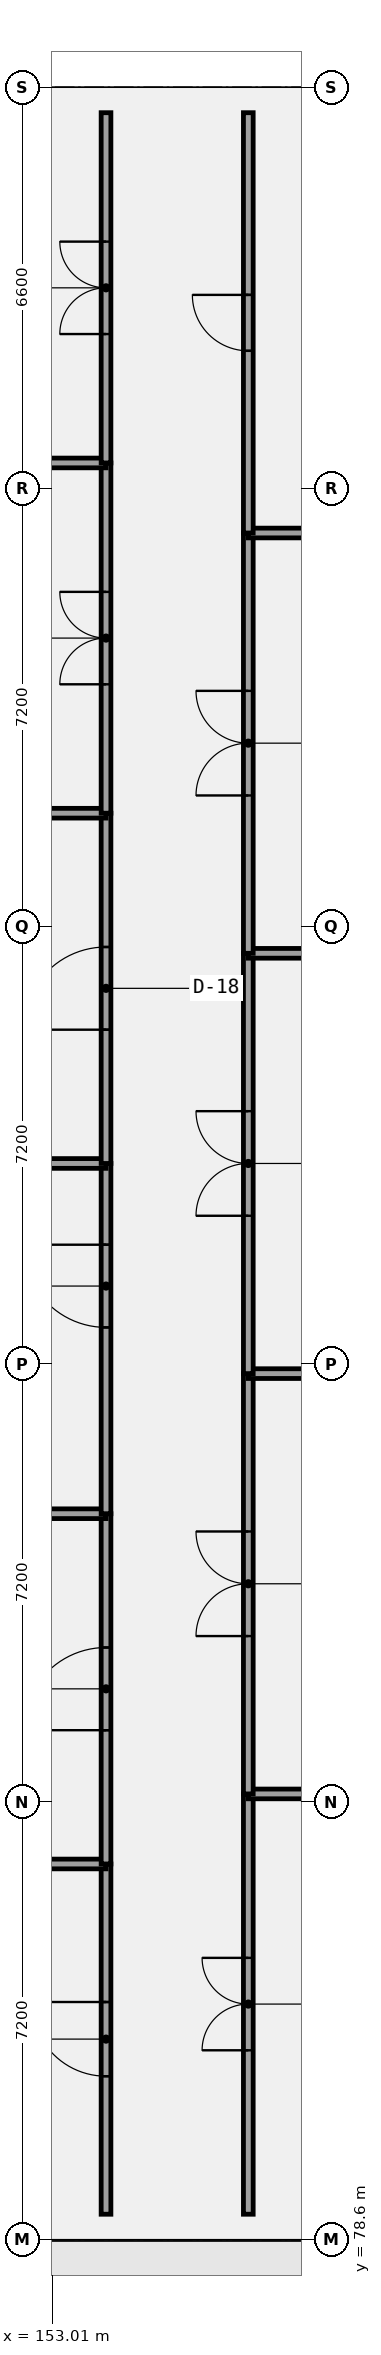
"""IFC4 building model, lengths in metres.
Left out: names, types, materials, properties, quantities, classifications, styles, units other than length and angle.
Written with IfcOpenShell. Run it as: python <this file> out.ifc"""

import sys

from ifc_helpers import new_model, si_unit, direction, frame, frame_2d, origin, place, context, subcontext, project, spatial, rectangle, extrude, element, fill, save


model = new_model("IFC4")
c1 = context("Model", 3, precision=1e-05, world=origin(), true_north=direction((0.0, 1.0)))
c2 = subcontext(c1, "Body", "Model", "MODEL_VIEW")
j1 = project(units=[si_unit("LENGTHUNIT", "METRE"), si_unit("PLANEANGLEUNIT", "RADIAN")], contexts=[c1])
p1 = place(None, origin())
s1 = spatial("IfcSite", under=j1, at=p1, CompositionType="ELEMENT")
p2 = place(p1, origin())
s2 = spatial("IfcBuilding", under=s1, at=p2, CompositionType="ELEMENT")
p3 = place(p2, frame((0.0, 0.0, 22.2)))
s3 = spatial("IfcBuildingStorey", under=s2, at=p3, CompositionType="ELEMENT", Elevation=22.2)
p4 = place(p3, frame((153.895, 79.02, 0.0), z_axis=(0.0, 0.0, 1.0), x_axis=(0.0, 1.0, 0.0)))
e1 = element("IfcWall", 1, at=p4, inside=s3, PredefinedType="PARTITIONING", context=c2, shape_type="SweptSolid", body=[
    extrude(rectangle(XDim=5.76, YDim=0.16, at=frame_2d((2.88, 0.0))), origin(), (0.0, 0.0, 1.0), 3.92),
])
p5 = place(p4, frame((2.27, 0.0, 0.0)))
e2 = element("IfcOpeningElement", 2, at=p5, cuts=e1, PredefinedType="OPENING", context=c2, shape_type="SweptSolid", body=[
    extrude(rectangle(XDim=1.22, YDim=2.35, at=frame_2d((0.61, 1.175))), frame((0.0, 0.09, 0.0), z_axis=(0.0, -1.0, 0.0), x_axis=(1.0, 0.0, 0.0)), (0.0, 0.0, 1.0), 0.18),
])
p6 = place(p3, frame((145.25, 84.78, 0.0), z_axis=(0.0, 0.0, 1.0), x_axis=(1.0, 0.0, 0.0)))
e3 = element("IfcWall", 3, at=p6, inside=s3, PredefinedType="PARTITIONING", context=c2, shape_type="SweptSolid", body=[
    extrude(rectangle(XDim=8.645, YDim=0.16, at=frame_2d((4.323, 0.0))), origin(), (0.0, 0.0, 1.0), 3.92),
])
p7 = place(p3, frame((153.895, 84.78, 0.0), z_axis=(0.0, 0.0, 1.0), x_axis=(0.0, 1.0, 0.0)))
e4 = element("IfcWall", 4, at=p7, inside=s3, PredefinedType="PARTITIONING", context=c2, shape_type="SweptSolid", body=[
    extrude(rectangle(XDim=5.76, YDim=0.16, at=frame_2d((2.88, 0.0))), origin(), (0.0, 0.0, 1.0), 3.92),
])
p8 = place(p7, frame((2.2, 0.0, 0.0)))
e5 = element("IfcOpeningElement", 5, at=p8, cuts=e4, PredefinedType="OPENING", context=c2, shape_type="SweptSolid", body=[
    extrude(rectangle(XDim=1.36, YDim=2.1, at=frame_2d((0.68, 1.05))), frame((0.0, 0.09, 0.0), z_axis=(0.0, -1.0, 0.0), x_axis=(1.0, 0.0, 0.0)), (0.0, 0.0, 1.0), 0.18),
])
p9 = place(p3, frame((145.25, 90.54, 0.0), z_axis=(0.0, 0.0, 1.0), x_axis=(1.0, 0.0, 0.0)))
e6 = element("IfcWall", 6, at=p9, inside=s3, PredefinedType="PARTITIONING", context=c2, shape_type="SweptSolid", body=[
    extrude(rectangle(XDim=8.645, YDim=0.16, at=frame_2d((4.323, 0.0))), origin(), (0.0, 0.0, 1.0), 3.92),
])
p10 = place(p3, frame((153.895, 90.54, 0.0), z_axis=(0.0, 0.0, 1.0), x_axis=(0.0, 1.0, 0.0)))
e7 = element("IfcWall", 7, at=p10, inside=s3, PredefinedType="PARTITIONING", context=c2, shape_type="SweptSolid", body=[
    extrude(rectangle(XDim=5.76, YDim=0.16, at=frame_2d((2.88, 0.0))), origin(), (0.0, 0.0, 1.0), 3.92),
])
p11 = place(p10, frame((3.064, 0.0, 0.0)))
e8 = element("IfcOpeningElement", 8, at=p11, cuts=e7, PredefinedType="OPENING", context=c2, shape_type="SweptSolid", body=[
    extrude(rectangle(XDim=1.36, YDim=2.22, at=frame_2d((0.68, 1.11))), frame((0.0, 0.09, 0.0), z_axis=(0.0, -1.0, 0.0), x_axis=(1.0, 0.0, 0.0)), (0.0, 0.0, 1.0), 0.18),
])
p12 = place(p3, frame((145.25, 96.3, 0.0), z_axis=(0.0, 0.0, 1.0), x_axis=(1.0, 0.0, 0.0)))
e9 = element("IfcWall", 9, at=p12, inside=s3, PredefinedType="PARTITIONING", context=c2, shape_type="SweptSolid", body=[
    extrude(rectangle(XDim=8.645, YDim=0.16, at=frame_2d((4.323, 0.0))), origin(), (0.0, 0.0, 1.0), 3.92),
])
p13 = place(p3, frame((153.895, 96.3, 0.0), z_axis=(0.0, 0.0, 1.0), x_axis=(0.0, 1.0, 0.0)))
e10 = element("IfcWall", 10, at=p13, inside=s3, PredefinedType="PARTITIONING", context=c2, shape_type="SweptSolid", body=[
    extrude(rectangle(XDim=5.76, YDim=0.16, at=frame_2d((2.88, 0.0))), origin(), (0.0, 0.0, 1.0), 3.92),
])
p14 = place(p13, frame((2.2, 0.0, 0.0)))
e11 = element("IfcOpeningElement", 11, at=p14, cuts=e10, PredefinedType="OPENING", context=c2, shape_type="SweptSolid", body=[
    extrude(rectangle(XDim=1.36, YDim=2.35, at=frame_2d((0.68, 1.175))), frame((0.0, 0.09, 0.0), z_axis=(0.0, -1.0, 0.0), x_axis=(1.0, 0.0, 0.0)), (0.0, 0.0, 1.0), 0.18),
])
p15 = place(p3, frame((145.25, 102.06, 0.0), z_axis=(0.0, 0.0, 1.0), x_axis=(1.0, 0.0, 0.0)))
e12 = element("IfcWall", 12, at=p15, inside=s3, PredefinedType="PARTITIONING", context=c2, shape_type="SweptSolid", body=[
    extrude(rectangle(XDim=8.645, YDim=0.16, at=frame_2d((4.323, 0.0))), origin(), (0.0, 0.0, 1.0), 3.37),
])
p16 = place(p3, frame((153.895, 102.06, 0.0), z_axis=(0.0, 0.0, 1.0), x_axis=(0.0, 1.0, 0.0)))
e13 = element("IfcWall", 13, at=p16, inside=s3, PredefinedType="PARTITIONING", context=c2, shape_type="SweptSolid", body=[
    extrude(rectangle(XDim=5.76, YDim=0.16, at=frame_2d((2.88, 0.0))), origin(), (0.0, 0.0, 1.0), 3.92),
])
p17 = place(p16, frame((2.12, 0.0, 0.0)))
e14 = element("IfcOpeningElement", 14, at=p17, cuts=e13, PredefinedType="OPENING", context=c2, shape_type="SweptSolid", body=[
    extrude(rectangle(XDim=1.52, YDim=2.1, at=frame_2d((0.76, 1.05))), frame((0.0, 0.09, 0.0), z_axis=(0.0, -1.0, 0.0), x_axis=(1.0, 0.0, 0.0)), (0.0, 0.0, 1.0), 0.18),
])
p18 = place(p3, frame((145.25, 107.82, 0.0), z_axis=(0.0, 0.0, 1.0), x_axis=(1.0, 0.0, 0.0)))
e15 = element("IfcWall", 15, at=p18, inside=s3, PredefinedType="PARTITIONING", context=c2, shape_type="SweptSolid", body=[
    extrude(rectangle(XDim=8.645, YDim=0.16, at=frame_2d((4.323, 0.0))), origin(), (0.0, 0.0, 1.0), 3.92),
])
p19 = place(p3, frame((153.895, 107.82, 0.0), z_axis=(0.0, 0.0, 1.0), x_axis=(0.0, 1.0, 0.0)))
e16 = element("IfcWall", 16, at=p19, inside=s3, PredefinedType="PARTITIONING", context=c2, shape_type="SweptSolid", body=[
    extrude(rectangle(XDim=5.76, YDim=0.16, at=frame_2d((2.88, 0.0))), origin(), (0.0, 0.0, 1.0), 3.92),
])
p20 = place(p19, frame((2.12, 0.0, 0.0)))
e17 = element("IfcOpeningElement", 17, at=p20, cuts=e16, PredefinedType="OPENING", context=c2, shape_type="SweptSolid", body=[
    extrude(rectangle(XDim=1.52, YDim=2.22, at=frame_2d((0.76, 1.11))), frame((0.0, 0.09, 0.0), z_axis=(0.0, -1.0, 0.0), x_axis=(1.0, 0.0, 0.0)), (0.0, 0.0, 1.0), 0.18),
])
p21 = place(p3, frame((156.235, 79.02, 0.0), z_axis=(0.0, 0.0, 1.0), x_axis=(0.0, 1.0, 0.0)))
e18 = element("IfcWall", 18, at=p21, inside=s3, PredefinedType="PARTITIONING", context=c2, shape_type="SweptSolid", body=[
    extrude(rectangle(XDim=6.912, YDim=0.16, at=frame_2d((3.456, 0.0))), origin(), (0.0, 0.0, 1.0), 3.92),
])
p22 = place(p21, frame((2.696, 0.0, 0.0)))
e19 = element("IfcOpeningElement", 19, at=p22, cuts=e18, PredefinedType="OPENING", context=c2, shape_type="SweptSolid", body=[
    extrude(rectangle(XDim=1.52, YDim=2.35, at=frame_2d((0.76, 1.175))), frame((0.0, 0.09, 0.0), z_axis=(0.0, -1.0, 0.0), x_axis=(1.0, 0.0, 0.0)), (0.0, 0.0, 1.0), 0.18),
])
p23 = place(p3, frame((156.235, 85.932, 0.0), z_axis=(0.0, 0.0, 1.0), x_axis=(1.0, 0.0, 0.0)))
e20 = element("IfcWall", 20, at=p23, inside=s3, PredefinedType="PARTITIONING", context=c2, shape_type="SweptSolid", body=[
    extrude(rectangle(XDim=9.785, YDim=0.16, at=frame_2d((4.893, 0.0))), origin(), (0.0, 0.0, 1.0), 2.37),
])
p24 = place(p3, frame((156.235, 85.932, 0.0), z_axis=(0.0, 0.0, 1.0), x_axis=(0.0, 1.0, 0.0)))
e21 = element("IfcWall", 21, at=p24, inside=s3, PredefinedType="PARTITIONING", context=c2, shape_type="SweptSolid", body=[
    extrude(rectangle(XDim=6.912, YDim=0.16, at=frame_2d((3.456, 0.0))), origin(), (0.0, 0.0, 1.0), 3.92),
])
p25 = place(p24, frame((2.596, 0.0, 0.0)))
e22 = element("IfcOpeningElement", 22, at=p25, cuts=e21, PredefinedType="OPENING", context=c2, shape_type="SweptSolid", body=[
    extrude(rectangle(XDim=1.72, YDim=2.1, at=frame_2d((0.86, 1.05))), frame((0.0, 0.09, 0.0), z_axis=(0.0, -1.0, 0.0), x_axis=(1.0, 0.0, 0.0)), (0.0, 0.0, 1.0), 0.18),
])
p26 = place(p3, frame((156.235, 92.844, 0.0), z_axis=(0.0, 0.0, 1.0), x_axis=(1.0, 0.0, 0.0)))
e23 = element("IfcWall", 23, at=p26, inside=s3, PredefinedType="PARTITIONING", context=c2, shape_type="SweptSolid", body=[
    extrude(rectangle(XDim=9.785, YDim=0.16, at=frame_2d((4.893, 0.0))), origin(), (0.0, 0.0, 1.0), 2.37),
])
p27 = place(p3, frame((156.235, 92.844, 0.0), z_axis=(0.0, 0.0, 1.0), x_axis=(0.0, 1.0, 0.0)))
e24 = element("IfcWall", 24, at=p27, inside=s3, PredefinedType="PARTITIONING", context=c2, shape_type="SweptSolid", body=[
    extrude(rectangle(XDim=6.912, YDim=0.16, at=frame_2d((3.456, 0.0))), origin(), (0.0, 0.0, 1.0), 3.92),
])
p28 = place(p27, frame((2.596, 0.0, 0.0)))
e25 = element("IfcOpeningElement", 25, at=p28, cuts=e24, PredefinedType="OPENING", context=c2, shape_type="SweptSolid", body=[
    extrude(rectangle(XDim=1.72, YDim=2.22, at=frame_2d((0.86, 1.11))), frame((0.0, 0.09, 0.0), z_axis=(0.0, -1.0, 0.0), x_axis=(1.0, 0.0, 0.0)), (0.0, 0.0, 1.0), 0.18),
])
p29 = place(p3, frame((156.235, 99.756, 0.0), z_axis=(0.0, 0.0, 1.0), x_axis=(1.0, 0.0, 0.0)))
e26 = element("IfcWall", 26, at=p29, inside=s3, PredefinedType="PARTITIONING", context=c2, shape_type="SweptSolid", body=[
    extrude(rectangle(XDim=9.785, YDim=0.16, at=frame_2d((4.893, 0.0))), origin(), (0.0, 0.0, 1.0), 2.37),
])
p30 = place(p3, frame((156.235, 99.756, 0.0), z_axis=(0.0, 0.0, 1.0), x_axis=(0.0, 1.0, 0.0)))
e27 = element("IfcWall", 27, at=p30, inside=s3, PredefinedType="PARTITIONING", context=c2, shape_type="SweptSolid", body=[
    extrude(rectangle(XDim=6.912, YDim=0.16, at=frame_2d((3.456, 0.0))), origin(), (0.0, 0.0, 1.0), 3.92),
])
p31 = place(p30, frame((2.596, 0.0, 0.0)))
e28 = element("IfcOpeningElement", 28, at=p31, cuts=e27, PredefinedType="OPENING", context=c2, shape_type="SweptSolid", body=[
    extrude(rectangle(XDim=1.72, YDim=2.35, at=frame_2d((0.86, 1.175))), frame((0.0, 0.09, 0.0), z_axis=(0.0, -1.0, 0.0), x_axis=(1.0, 0.0, 0.0)), (0.0, 0.0, 1.0), 0.18),
])
p32 = place(p3, frame((156.235, 106.668, 0.0), z_axis=(0.0, 0.0, 1.0), x_axis=(1.0, 0.0, 0.0)))
e29 = element("IfcWall", 29, at=p32, inside=s3, PredefinedType="PARTITIONING", context=c2, shape_type="SweptSolid", body=[
    extrude(rectangle(XDim=9.785, YDim=0.16, at=frame_2d((4.893, 0.0))), origin(), (0.0, 0.0, 1.0), 3.92),
])
p33 = place(p3, frame((156.235, 106.668, 0.0), z_axis=(0.0, 0.0, 1.0), x_axis=(0.0, 1.0, 0.0)))
e30 = element("IfcWall", 30, at=p33, inside=s3, PredefinedType="PARTITIONING", context=c2, shape_type="SweptSolid", body=[
    extrude(rectangle(XDim=6.912, YDim=0.16, at=frame_2d((3.456, 0.0))), origin(), (0.0, 0.0, 1.0), 3.92),
])
p34 = place(p33, frame((2.996, 0.0, 0.0)))
e31 = element("IfcOpeningElement", 31, at=p34, cuts=e30, PredefinedType="OPENING", context=c2, shape_type="SweptSolid", body=[
    extrude(rectangle(XDim=0.92, YDim=2.1, at=frame_2d((0.46, 1.05))), frame((0.0, 0.09, 0.0), z_axis=(0.0, -1.0, 0.0), x_axis=(1.0, 0.0, 0.0)), (0.0, 0.0, 1.0), 0.18),
])
p35 = place(p5, frame((1.22, 0.0, 0.0), z_axis=(0.0, 0.0, 1.0), x_axis=(-1.0, 0.0, 0.0)))
e32 = element("IfcDoor", 32, at=p35, inside=s3, OperationType="SINGLE_SWING_RIGHT", PredefinedType="DOOR", context=c2, shape_type="SweptSolid", body=[
    extrude(rectangle(XDim=1.22, YDim=2.35, at=frame_2d((0.61, 1.175))), frame((0.0, 0.025, 0.0), z_axis=(0.0, -1.0, 0.0), x_axis=(1.0, 0.0, 0.0)), (0.0, 0.0, 1.0), 0.05),
])
fill(e2, e32)
p36 = place(p8, frame((1.36, 0.0, 0.0), z_axis=(0.0, 0.0, 1.0), x_axis=(-1.0, 0.0, 0.0)))
e33 = element("IfcDoor", 33, at=p36, inside=s3, OperationType="SINGLE_SWING_LEFT", PredefinedType="DOOR", context=c2, shape_type="SweptSolid", body=[
    extrude(rectangle(XDim=1.36, YDim=2.1, at=frame_2d((0.68, 1.05))), frame((0.0, 0.025, 0.0), z_axis=(0.0, -1.0, 0.0), x_axis=(1.0, 0.0, 0.0)), (0.0, 0.0, 1.0), 0.05),
])
fill(e5, e33)
p37 = place(p11, frame((1.36, 0.0, 0.0), z_axis=(0.0, 0.0, 1.0), x_axis=(-1.0, 0.0, 0.0)))
e34 = element("IfcDoor", 34, at=p37, inside=s3, OperationType="SINGLE_SWING_RIGHT", PredefinedType="DOOR", context=c2, shape_type="SweptSolid", body=[
    extrude(rectangle(XDim=1.36, YDim=2.22, at=frame_2d((0.68, 1.11))), frame((0.0, 0.025, 0.0), z_axis=(0.0, -1.0, 0.0), x_axis=(1.0, 0.0, 0.0)), (0.0, 0.0, 1.0), 0.05),
])
fill(e8, e34)
p38 = place(p14, frame((1.36, 0.0, 0.0), z_axis=(0.0, 0.0, 1.0), x_axis=(-1.0, 0.0, 0.0)))
e35 = element("IfcDoor", 35, at=p38, inside=s3, OperationType="SINGLE_SWING_LEFT", PredefinedType="DOOR", context=c2, shape_type="SweptSolid", body=[
    extrude(rectangle(XDim=1.36, YDim=2.35, at=frame_2d((0.68, 1.175))), frame((0.0, 0.025, 0.0), z_axis=(0.0, -1.0, 0.0), x_axis=(1.0, 0.0, 0.0)), (0.0, 0.0, 1.0), 0.05),
])
fill(e11, e35)
p39 = place(p17, frame((1.52, 0.0, 0.0), z_axis=(0.0, 0.0, 1.0), x_axis=(-1.0, 0.0, 0.0)))
e36 = element("IfcDoor", 36, at=p39, inside=s3, OperationType="DOUBLE_DOOR_SINGLE_SWING", PredefinedType="DOOR", context=c2, shape_type="SweptSolid", body=[
    extrude(rectangle(XDim=1.52, YDim=2.1, at=frame_2d((0.76, 1.05))), frame((0.0, 0.025, 0.0), z_axis=(0.0, -1.0, 0.0), x_axis=(1.0, 0.0, 0.0)), (0.0, 0.0, 1.0), 0.05),
])
fill(e14, e36)
p40 = place(p20, frame((1.52, 0.0, 0.0), z_axis=(0.0, 0.0, 1.0), x_axis=(-1.0, 0.0, 0.0)))
e37 = element("IfcDoor", 37, at=p40, inside=s3, OperationType="DOUBLE_DOOR_SINGLE_SWING", PredefinedType="DOOR", context=c2, shape_type="SweptSolid", body=[
    extrude(rectangle(XDim=1.52, YDim=2.22, at=frame_2d((0.76, 1.11))), frame((0.0, 0.025, 0.0), z_axis=(0.0, -1.0, 0.0), x_axis=(1.0, 0.0, 0.0)), (0.0, 0.0, 1.0), 0.05),
])
fill(e17, e37)
p41 = place(p22, origin())
e38 = element("IfcDoor", 38, at=p41, inside=s3, OperationType="DOUBLE_DOOR_SINGLE_SWING", PredefinedType="DOOR", context=c2, shape_type="SweptSolid", body=[
    extrude(rectangle(XDim=1.52, YDim=2.35, at=frame_2d((0.76, 1.175))), frame((0.0, 0.025, 0.0), z_axis=(0.0, -1.0, 0.0), x_axis=(1.0, 0.0, 0.0)), (0.0, 0.0, 1.0), 0.05),
])
fill(e19, e38)
p42 = place(p25, origin())
e39 = element("IfcDoor", 39, at=p42, inside=s3, OperationType="DOUBLE_DOOR_SINGLE_SWING", PredefinedType="DOOR", context=c2, shape_type="SweptSolid", body=[
    extrude(rectangle(XDim=1.72, YDim=2.1, at=frame_2d((0.86, 1.05))), frame((0.0, 0.025, 0.0), z_axis=(0.0, -1.0, 0.0), x_axis=(1.0, 0.0, 0.0)), (0.0, 0.0, 1.0), 0.05),
])
fill(e22, e39)
p43 = place(p28, origin())
e40 = element("IfcDoor", 40, at=p43, inside=s3, OperationType="DOUBLE_DOOR_SINGLE_SWING", PredefinedType="DOOR", context=c2, shape_type="SweptSolid", body=[
    extrude(rectangle(XDim=1.72, YDim=2.22, at=frame_2d((0.86, 1.11))), frame((0.0, 0.025, 0.0), z_axis=(0.0, -1.0, 0.0), x_axis=(1.0, 0.0, 0.0)), (0.0, 0.0, 1.0), 0.05),
])
fill(e25, e40)
p44 = place(p31, origin())
e41 = element("IfcDoor", 41, at=p44, inside=s3, OperationType="DOUBLE_DOOR_SINGLE_SWING", PredefinedType="DOOR", context=c2, shape_type="SweptSolid", body=[
    extrude(rectangle(XDim=1.72, YDim=2.35, at=frame_2d((0.86, 1.175))), frame((0.0, 0.025, 0.0), z_axis=(0.0, -1.0, 0.0), x_axis=(1.0, 0.0, 0.0)), (0.0, 0.0, 1.0), 0.05),
])
fill(e28, e41)
p45 = place(p34, origin())
e42 = element("IfcDoor", 42, at=p45, inside=s3, OperationType="SINGLE_SWING_RIGHT", PredefinedType="DOOR", context=c2, shape_type="SweptSolid", body=[
    extrude(rectangle(XDim=0.92, YDim=2.1, at=frame_2d((0.46, 1.05))), frame((0.0, 0.025, 0.0), z_axis=(0.0, -1.0, 0.0), x_axis=(1.0, 0.0, 0.0)), (0.0, 0.0, 1.0), 0.05),
])
fill(e31, e42)
save(model, sys.argv[1])
